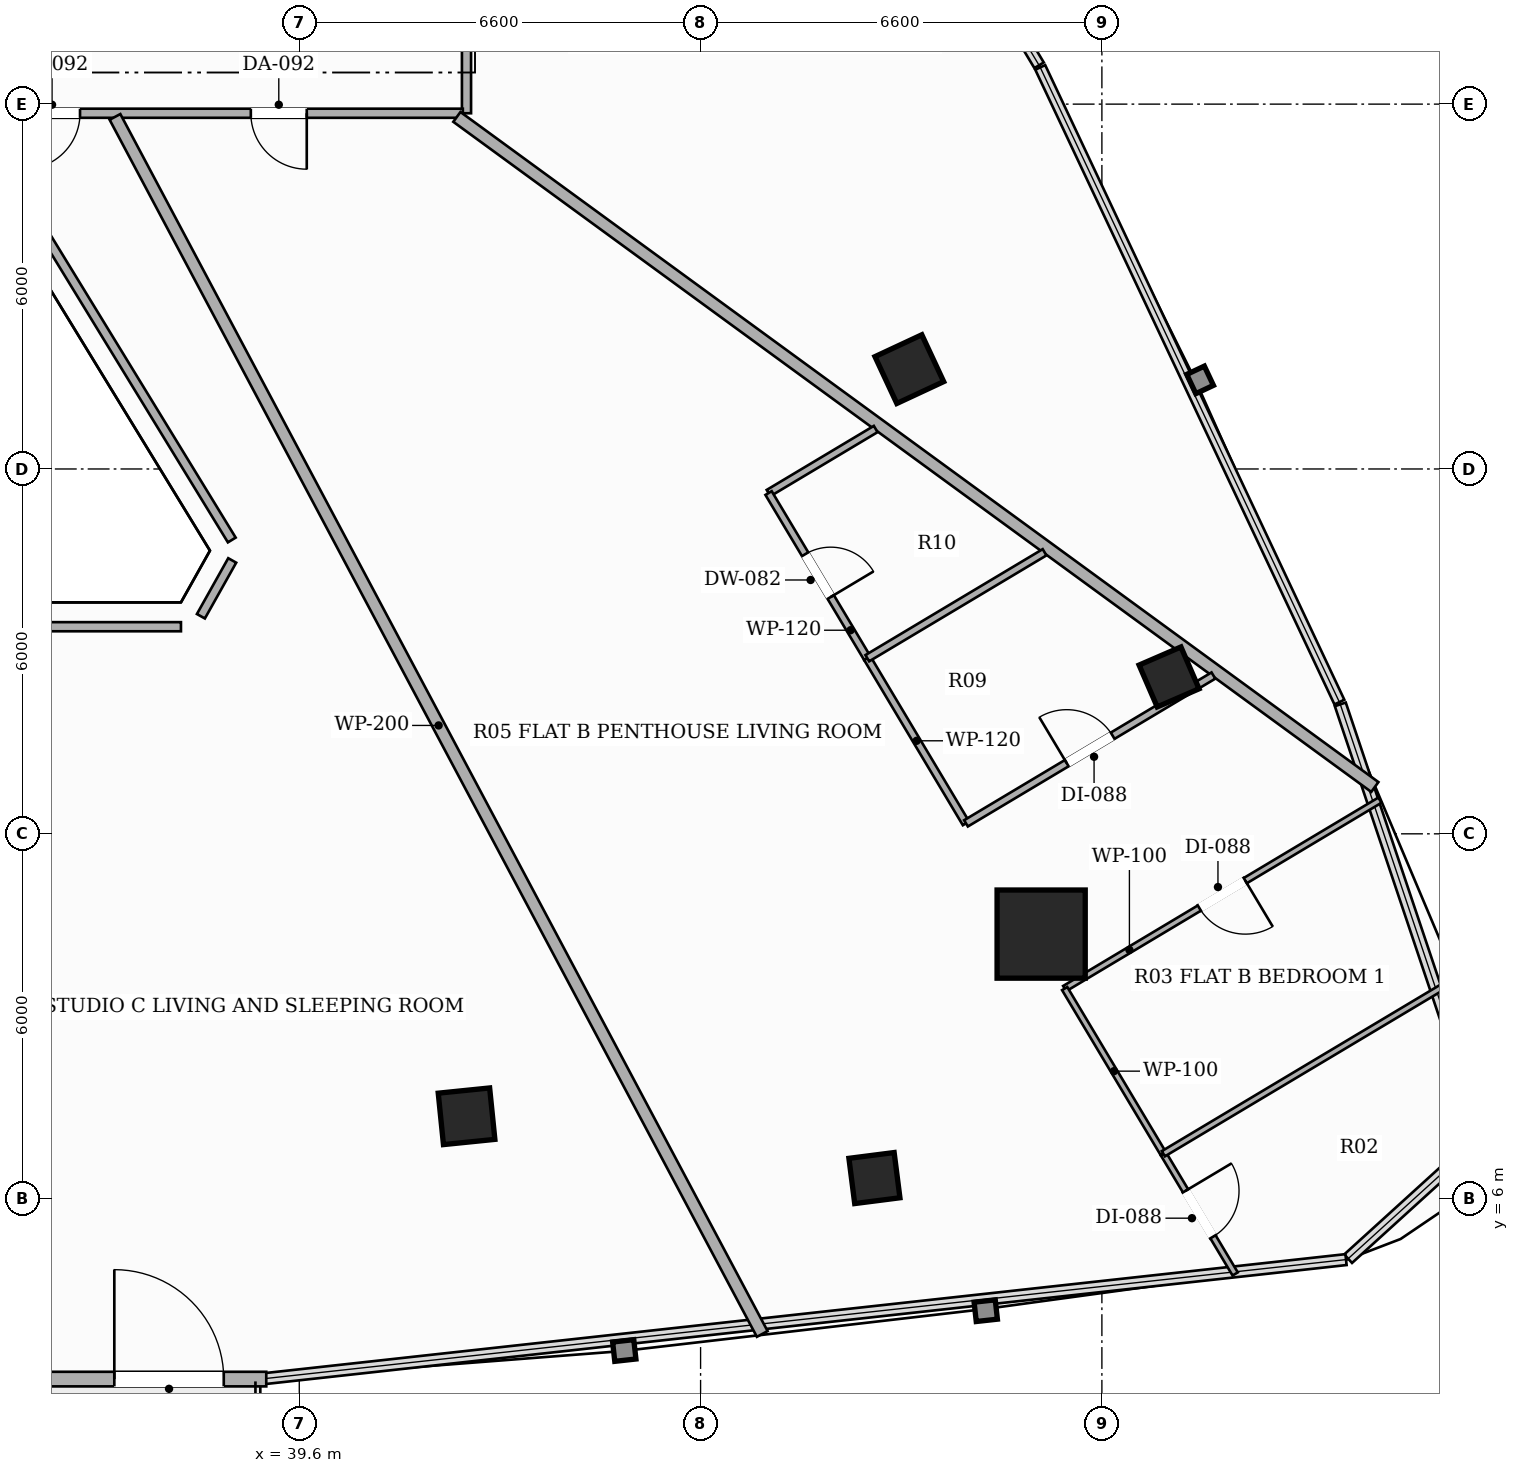
"""IFC4 building model, lengths in metres.
Left out: names, types, materials, properties, quantities, classifications, styles, units other than length and angle.
Written with IfcOpenShell. Run it as: python <this file> out.ifc"""

import sys

from ifc_helpers import new_model, si_unit, direction, frame, frame_2d, origin, origin_2d, place, context, subcontext, project, spatial, rectangle, hollow_rectangle, extrude, element, fill, save


model = new_model("IFC4")
c1 = context("Model", 3, precision=1e-05, world=origin(), true_north=direction((0.0, 1.0)))
c2 = subcontext(c1, "Body", "Model", "MODEL_VIEW")
j1 = project(units=[si_unit("LENGTHUNIT", "METRE"), si_unit("PLANEANGLEUNIT", "RADIAN")], contexts=[c1])
p1 = place(None, origin())
s1 = spatial("IfcSite", under=j1, at=p1, CompositionType="ELEMENT")
p2 = place(p1, origin())
s2 = spatial("IfcBuilding", under=s1, at=p2, CompositionType="ELEMENT")
p3 = place(p2, frame((0.0, 0.0, 123.2)))
s3 = spatial("IfcBuildingStorey", under=s2, at=p3, CompositionType="ELEMENT", Elevation=123.2)
p4 = place(p3, frame((51.801, 10.351, 0.0), z_axis=(0.0, 0.0, 1.0), x_axis=(1.0, 0.0, 0.0)))
e1 = element("IfcColumn", 1, at=p4, inside=s3, PredefinedType="COLUMN", context=c2, shape_type="SweptSolid", body=[
    extrude(hollow_rectangle(XDim=1.45, YDim=1.45, WallThickness=0.045, at=origin_2d()), origin(), (0.0, 0.0, 1.0), 3.3),
])
for number, where, z_axis, x_axis in (
    (2, (42.351, 7.355, 0.0), (0.0, 0.0, 1.0), (0.995, 0.101, 0.0)),
    (3, (49.633, 19.642, 0.0), (0.0, 0.0, 1.0), (-0.423, 0.906, 0.0)),
):
    element("IfcColumn", number, at=place(p3, frame(where, z_axis=z_axis, x_axis=x_axis)), inside=s3, PredefinedType="COLUMN", context=c2, shape_type="SweptSolid", body=[
        extrude(hollow_rectangle(XDim=0.85, YDim=0.85, WallThickness=0.028, at=origin_2d()), origin(), (0.0, 0.0, 1.0), 3.3),
    ])
for number, where, z_axis, x_axis in (
    (4, (49.059, 6.339, 0.0), (0.0, 0.0, 1.0), (0.992, 0.127, 0.0)),
    (5, (53.905, 14.58, 0.0), (0.0, 0.0, 1.0), (-0.397, 0.918, 0.0)),
):
    element("IfcColumn", number, at=place(p3, frame(where, z_axis=z_axis, x_axis=x_axis)), inside=s3, PredefinedType="COLUMN", context=c2, shape_type="SweptSolid", body=[
        extrude(hollow_rectangle(XDim=0.75, YDim=0.75, WallThickness=0.025, at=origin_2d()), origin(), (0.0, 0.0, 1.0), 3.3),
    ])
p5 = place(p3, frame((26.943, 3.033, 0.0), z_axis=(0.0, 0.0, 1.0), x_axis=(1.0, 0.0, 0.0)))
e6 = element("IfcWall", 6, at=p5, inside=s3, PredefinedType="SOLIDWALL", context=c2, shape_type="SweptSolid", body=[
    extrude(rectangle(XDim=12.114, YDim=0.24, at=frame_2d((6.057, 0.0))), origin(), (0.0, 0.0, 1.0), 2.624),
])
p6 = place(p5, frame((9.615, 0.0, 0.0)))
e7 = element("IfcOpeningElement", 7, at=p6, cuts=e6, PredefinedType="OPENING", context=c2, shape_type="SweptSolid", body=[
    extrude(rectangle(XDim=1.8, YDim=2.2, at=frame_2d((0.9, 1.1))), frame((0.0, 0.13, 0.0), z_axis=(0.0, -1.0, 0.0), x_axis=(1.0, 0.0, 0.0)), (0.0, 0.0, 1.0), 0.26),
])
p7 = place(p3, frame((42.35, 28.34, 0.0), z_axis=(0.0, 0.0, 1.0), x_axis=(0.0, -1.0, 0.0)))
e8 = element("IfcWall", 8, at=p7, inside=s3, PredefinedType="PARTITIONING", context=c2, shape_type="SweptSolid", body=[
    extrude(rectangle(XDim=4.49, YDim=0.15, at=frame_2d((2.245, 0.0))), origin(), (0.0, 0.0, 1.0), 2.721),
])
p8 = place(p7, frame((1.805, 0.0, 0.0)))
e9 = element("IfcOpeningElement", 9, at=p8, cuts=e8, PredefinedType="OPENING", context=c2, shape_type="SweptSolid", body=[
    extrude(rectangle(XDim=0.88, YDim=2.1, at=frame_2d((0.44, 1.05))), frame((0.0, 0.085, 0.0), z_axis=(0.0, -1.0, 0.0), x_axis=(1.0, 0.0, 0.0)), (0.0, 0.0, 1.0), 0.17),
])
p9 = place(p3, frame((42.29, 23.85, 0.0), z_axis=(0.0, 0.0, 1.0), x_axis=(-1.0, 0.0, 0.0)))
e10 = element("IfcWall", 10, at=p9, inside=s3, PredefinedType="PARTITIONING", context=c2, shape_type="SweptSolid", body=[
    extrude(rectangle(XDim=8.088, YDim=0.15, at=frame_2d((4.044, 0.0))), origin(), (0.0, 0.0, 1.0), 2.492),
])
p10 = place(p9, frame((2.567, 0.0, 0.0)))
e11 = element("IfcOpeningElement", 11, at=p10, cuts=e10, PredefinedType="OPENING", context=c2, shape_type="SweptSolid", body=[
    extrude(rectangle(XDim=0.92, YDim=2.15, at=frame_2d((0.46, 1.075))), frame((0.0, 0.085, 0.0), z_axis=(0.0, -1.0, 0.0), x_axis=(1.0, 0.0, 0.0)), (0.0, 0.0, 1.0), 0.17),
])
p11 = place(p9, frame((6.296, 0.0, 0.0)))
e12 = element("IfcOpeningElement", 12, at=p11, cuts=e10, PredefinedType="OPENING", context=c2, shape_type="SweptSolid", body=[
    extrude(rectangle(XDim=0.92, YDim=2.15, at=frame_2d((0.46, 1.075))), frame((0.0, 0.085, 0.0), z_axis=(0.0, -1.0, 0.0), x_axis=(1.0, 0.0, 0.0)), (0.0, 0.0, 1.0), 0.17),
])
p12 = place(p3, frame((34.233, 23.79, 0.0), z_axis=(0.0, 0.0, 1.0), x_axis=(0.521893040745, -0.853010934292, 0.0)))
e13 = element("IfcWall", 13, at=p12, inside=s3, PredefinedType="PARTITIONING", context=c2, shape_type="SweptSolid", body=[
    extrude(rectangle(XDim=8.157, YDim=0.15, at=frame_2d((4.079, 0.0))), origin(), (0.0, 0.0, 1.0), 2.721),
])
p13 = place(p3, frame((38.497, 16.496, 0.0), z_axis=(0.0, 0.0, 1.0), x_axis=(-0.489281087794, -0.872126147485, 0.0)))
e14 = element("IfcWall", 14, at=p13, inside=s3, PredefinedType="PARTITIONING", context=c2, shape_type="SweptSolid", body=[
    extrude(rectangle(XDim=1.053, YDim=0.15, at=frame_2d((0.526, 0.0))), origin(), (0.0, 0.0, 1.0), 3.06),
])
p14 = place(p3, frame((37.654, 15.406, 0.0), z_axis=(0.0, 0.0, 1.0), x_axis=(-1.0, 0.0, 0.0)))
e15 = element("IfcWall", 15, at=p14, inside=s3, PredefinedType="PARTITIONING", context=c2, shape_type="SweptSolid", body=[
    extrude(rectangle(XDim=9.308, YDim=0.15, at=frame_2d((4.654, 0.0))), origin(), (0.0, 0.0, 1.0), 2.721),
])
p15 = place(p3, frame((47.214, 3.775, 0.0), z_axis=(0.0, 0.0, 1.0), x_axis=(-0.469567249912, 0.88289670846, 0.0)))
e16 = element("IfcWall", 16, at=p15, inside=s3, PredefinedType="PARTITIONING", context=c2, shape_type="SweptSolid", body=[
    extrude(rectangle(XDim=22.67, YDim=0.2, at=frame_2d((11.335, 0.0))), origin(), (0.0, 0.0, 1.0), 2.413),
])
p16 = place(p3, frame((42.192, 23.79, 0.0), z_axis=(0.0, 0.0, 1.0), x_axis=(0.807710254014, -0.589579634621, 0.0)))
e17 = element("IfcWall", 17, at=p16, inside=s3, PredefinedType="PARTITIONING", context=c2, shape_type="SweptSolid", body=[
    extrude(rectangle(XDim=18.691, YDim=0.2, at=frame_2d((9.346, 0.0))), origin(), (0.0, 0.0, 1.0), 2.413),
])
p17 = place(p3, frame((49.08, 18.657, 0.0), z_axis=(0.0, 0.0, 1.0), x_axis=(-0.858394155401, -0.51299071529, 0.0)))
e18 = element("IfcWall", 18, at=p17, inside=s3, PredefinedType="PARTITIONING", context=c2, shape_type="SweptSolid", body=[
    extrude(rectangle(XDim=2.053, YDim=0.12, at=frame_2d((1.026, 0.0))), origin(), (0.0, 0.0, 1.0), 2.721),
])
p18 = place(p3, frame((47.318, 17.604, 0.0), z_axis=(0.0, 0.0, 1.0), x_axis=(0.51313361254, -0.858308741469, 0.0)))
e19 = element("IfcWall", 19, at=p18, inside=s3, PredefinedType="PARTITIONING", context=c2, shape_type="SweptSolid", body=[
    extrude(rectangle(XDim=3.165, YDim=0.12, at=frame_2d((1.582, 0.0))), origin(), (0.0, 0.0, 1.0), 2.492),
])
p19 = place(p18, frame((1.172, 0.0, 0.0)))
e20 = element("IfcOpeningElement", 20, at=p19, cuts=e19, PredefinedType="OPENING", context=c2, shape_type="SweptSolid", body=[
    extrude(rectangle(XDim=0.82, YDim=2.1, at=frame_2d((0.41, 1.05))), frame((0.0, 0.07, 0.0), z_axis=(0.0, -1.0, 0.0), x_axis=(1.0, 0.0, 0.0)), (0.0, 0.0, 1.0), 0.14),
])
p20 = place(p3, frame((48.942, 14.888, 0.0), z_axis=(0.0, 0.0, 1.0), x_axis=(0.512997049548, -0.858390369911, 0.0)))
e21 = element("IfcWall", 21, at=p20, inside=s3, PredefinedType="PARTITIONING", context=c2, shape_type="SweptSolid", body=[
    extrude(rectangle(XDim=3.164, YDim=0.12, at=frame_2d((1.582, 0.0))), origin(), (0.0, 0.0, 1.0), 2.492),
])
p21 = place(p3, frame((50.565, 12.172, 0.0), z_axis=(0.0, 0.0, 1.0), x_axis=(0.858473034369, 0.512858703018, 0.0)))
e22 = element("IfcWall", 22, at=p21, inside=s3, PredefinedType="PARTITIONING", context=c2, shape_type="SweptSolid", body=[
    extrude(rectangle(XDim=4.74, YDim=0.12, at=frame_2d((2.37, 0.0))), origin(), (0.0, 0.0, 1.0), 2.413),
])
p22 = place(p21, frame((1.93, 0.0, 0.0)))
e23 = element("IfcOpeningElement", 23, at=p22, cuts=e22, PredefinedType="OPENING", context=c2, shape_type="SweptSolid", body=[
    extrude(rectangle(XDim=0.88, YDim=2.1, at=frame_2d((0.44, 1.05))), frame((0.0, 0.07, 0.0), z_axis=(0.0, -1.0, 0.0), x_axis=(1.0, 0.0, 0.0)), (0.0, 0.0, 1.0), 0.14),
])
p23 = place(p3, frame((57.373, 12.554, 0.0), z_axis=(0.0, 0.0, 1.0), x_axis=(-0.858379637305, -0.513015007831, 0.0)))
e24 = element("IfcWall", 24, at=p23, inside=s3, PredefinedType="PARTITIONING", context=c2, shape_type="SweptSolid", body=[
    extrude(rectangle(XDim=6.041, YDim=0.1, at=frame_2d((3.02, 0.0))), origin(), (0.0, 0.0, 1.0), 2.619),
])
p24 = place(p23, frame((2.58, 0.0, 0.0)))
e25 = element("IfcOpeningElement", 25, at=p24, cuts=e24, PredefinedType="OPENING", context=c2, shape_type="SweptSolid", body=[
    extrude(rectangle(XDim=0.88, YDim=2.1, at=frame_2d((0.44, 1.05))), frame((0.0, 0.06, 0.0), z_axis=(0.0, -1.0, 0.0), x_axis=(1.0, 0.0, 0.0)), (0.0, 0.0, 1.0), 0.12),
])
p25 = place(p3, frame((52.188, 9.455, 0.0), z_axis=(0.0, 0.0, 1.0), x_axis=(0.512963071382, -0.858410675259, 0.0)))
e26 = element("IfcWall", 26, at=p25, inside=s3, PredefinedType="PARTITIONING", context=c2, shape_type="SweptSolid", body=[
    extrude(rectangle(XDim=3.164, YDim=0.1, at=frame_2d((1.582, 0.0))), origin(), (0.0, 0.0, 1.0), 2.619),
])
p26 = place(p3, frame((53.811, 6.739, 0.0), z_axis=(0.0, 0.0, 1.0), x_axis=(0.512795384263, -0.858510858335, 0.0)))
e27 = element("IfcWall", 27, at=p26, inside=s3, PredefinedType="PARTITIONING", context=c2, shape_type="SweptSolid", body=[
    extrude(rectangle(XDim=2.303, YDim=0.1, at=frame_2d((1.151, 0.0))), origin(), (0.0, 0.0, 1.0), 3.06),
])
p27 = place(p26, frame((0.711, 0.0, 0.0)))
e28 = element("IfcOpeningElement", 28, at=p27, cuts=e27, PredefinedType="OPENING", context=c2, shape_type="SweptSolid", body=[
    extrude(rectangle(XDim=0.88, YDim=2.1, at=frame_2d((0.44, 1.05))), frame((0.0, 0.06, 0.0), z_axis=(0.0, -1.0, 0.0), x_axis=(1.0, 0.0, 0.0)), (0.0, 0.0, 1.0), 0.12),
])
p28 = place(p3, frame((51.857, 16.63, 0.0), z_axis=(0.0, 0.0, 1.0), x_axis=(-0.858411372428, -0.512961904713, 0.0)))
e29 = element("IfcWall", 29, at=p28, inside=s3, PredefinedType="PARTITIONING", context=c2, shape_type="SweptSolid", body=[
    extrude(rectangle(XDim=3.396, YDim=0.12, at=frame_2d((1.698, 0.0))), origin(), (0.0, 0.0, 1.0), 2.413),
])
p29 = place(p3, frame((58.617, 9.61, 0.0), z_axis=(0.0, 0.0, 1.0), x_axis=(-0.858472602363, -0.512859426151, 0.0)))
e30 = element("IfcWall", 30, at=p29, inside=s3, PredefinedType="PARTITIONING", context=c2, shape_type="SweptSolid", body=[
    extrude(rectangle(XDim=5.598, YDim=0.1, at=frame_2d((2.799, 0.0))), origin(), (0.0, 0.0, 1.0), 3.06),
])
p30 = place(p6, origin())
e31 = element("IfcDoor", 31, at=p30, inside=s3, OperationType="SINGLE_SWING_LEFT", PredefinedType="DOOR", context=c2, shape_type="SweptSolid", body=[
    extrude(rectangle(XDim=1.8, YDim=2.2, at=frame_2d((0.9, 1.1))), frame((0.0, 0.025, 0.0), z_axis=(0.0, -1.0, 0.0), x_axis=(1.0, 0.0, 0.0)), (0.0, 0.0, 1.0), 0.05),
])
fill(e7, e31)
p31 = place(p10, origin())
e32 = element("IfcDoor", 32, at=p31, inside=s3, OperationType="SINGLE_SWING_LEFT", PredefinedType="DOOR", context=c2, shape_type="SweptSolid", body=[
    extrude(rectangle(XDim=0.92, YDim=2.15, at=frame_2d((0.46, 1.075))), frame((0.0, 0.025, 0.0), z_axis=(0.0, -1.0, 0.0), x_axis=(1.0, 0.0, 0.0)), (0.0, 0.0, 1.0), 0.05),
])
fill(e11, e32)
p32 = place(p19, origin())
e33 = element("IfcDoor", 33, at=p32, inside=s3, OperationType="SINGLE_SWING_RIGHT", PredefinedType="DOOR", context=c2, shape_type="SweptSolid", body=[
    extrude(rectangle(XDim=0.82, YDim=2.1, at=frame_2d((0.41, 1.05))), frame((0.0, 0.025, 0.0), z_axis=(0.0, -1.0, 0.0), x_axis=(1.0, 0.0, 0.0)), (0.0, 0.0, 1.0), 0.05),
])
fill(e20, e33)
p33 = place(p22, origin())
e34 = element("IfcDoor", 34, at=p33, inside=s3, OperationType="SINGLE_SWING_LEFT", PredefinedType="DOOR", context=c2, shape_type="SweptSolid", body=[
    extrude(rectangle(XDim=0.88, YDim=2.1, at=frame_2d((0.44, 1.05))), frame((0.0, 0.025, 0.0), z_axis=(0.0, -1.0, 0.0), x_axis=(1.0, 0.0, 0.0)), (0.0, 0.0, 1.0), 0.05),
])
fill(e23, e34)
p34 = place(p24, origin())
e35 = element("IfcDoor", 35, at=p34, inside=s3, OperationType="SINGLE_SWING_LEFT", PredefinedType="DOOR", context=c2, shape_type="SweptSolid", body=[
    extrude(rectangle(XDim=0.88, YDim=2.1, at=frame_2d((0.44, 1.05))), frame((0.0, 0.025, 0.0), z_axis=(0.0, -1.0, 0.0), x_axis=(1.0, 0.0, 0.0)), (0.0, 0.0, 1.0), 0.05),
])
fill(e25, e35)
p35 = place(p27, origin())
e36 = element("IfcDoor", 36, at=p35, inside=s3, OperationType="SINGLE_SWING_LEFT", PredefinedType="DOOR", context=c2, shape_type="SweptSolid", body=[
    extrude(rectangle(XDim=0.88, YDim=2.1, at=frame_2d((0.44, 1.05))), frame((0.0, 0.025, 0.0), z_axis=(0.0, -1.0, 0.0), x_axis=(1.0, 0.0, 0.0)), (0.0, 0.0, 1.0), 0.05),
])
fill(e28, e36)
p36 = place(p11, origin())
e37 = element("IfcDoor", 37, at=p36, inside=s3, OperationType="SINGLE_SWING_RIGHT", PredefinedType="DOOR", context=c2, shape_type="SweptSolid", body=[
    extrude(rectangle(XDim=0.92, YDim=2.15, at=frame_2d((0.46, 1.075))), frame((0.0, 0.025, 0.0), z_axis=(0.0, -1.0, 0.0), x_axis=(1.0, 0.0, 0.0)), (0.0, 0.0, 1.0), 0.05),
])
fill(e12, e37)
save(model, sys.argv[1])
